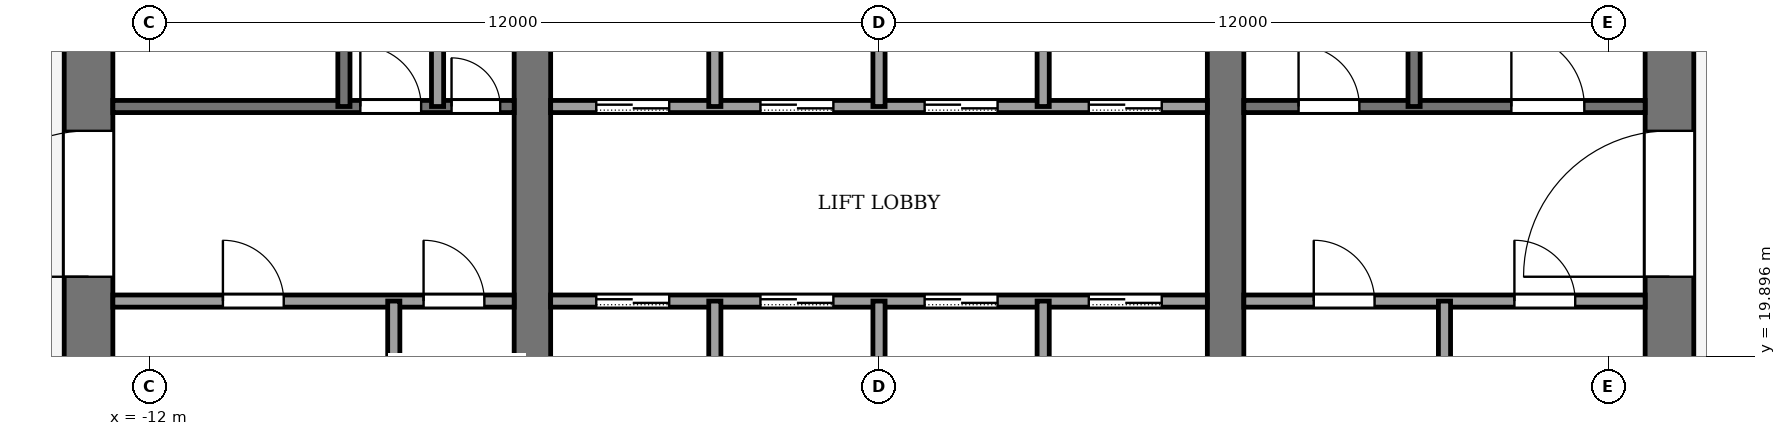
"""IFC4 building model, lengths in metres.
Left out: names, types, materials, properties, quantities, classifications, styles, units other than length and angle.
Written with IfcOpenShell. Run it as: python <this file> out.ifc"""

import sys

from ifc_helpers import new_model, si_unit, direction, frame, frame_2d, origin, place, context, subcontext, project, spatial, rectangle, extrude, element, fill, save


model = new_model("IFC4")
c1 = context("Model", 3, precision=1e-05, world=origin(), true_north=direction((0.0, 1.0)))
c2 = subcontext(c1, "Body", "Model", "MODEL_VIEW")
j1 = project(units=[si_unit("LENGTHUNIT", "METRE"), si_unit("PLANEANGLEUNIT", "RADIAN")], contexts=[c1])
p1 = place(None, origin())
s1 = spatial("IfcSite", under=j1, at=p1, CompositionType="ELEMENT")
p2 = place(p1, origin())
s2 = spatial("IfcBuilding", under=s1, at=p2, CompositionType="ELEMENT")
p3 = place(p2, frame((0.0, 0.0, 262.0)))
s3 = spatial("IfcBuildingStorey", under=s2, at=p3, CompositionType="ELEMENT", Elevation=262.0)
p4 = place(p3, frame((-13.0, 18.4, -0.13), z_axis=(0.0, 0.0, 1.0), x_axis=(0.0, 1.0, 0.0)))
e1 = element("IfcWall", 1, at=p4, inside=s3, PredefinedType="SHEAR", context=c2, shape_type="SweptSolid", body=[
    extrude(rectangle(XDim=19.2, YDim=0.8, at=frame_2d((9.6, 0.0))), origin(), (0.0, 0.0, 1.0), 4.0),
])
p5 = place(p4, frame((2.8, 0.0, 0.13)))
e2 = element("IfcOpeningElement", 2, at=p5, cuts=e1, PredefinedType="OPENING", context=c2, shape_type="SweptSolid", body=[
    extrude(rectangle(XDim=2.4, YDim=2.4, at=frame_2d((1.2, 1.2))), frame((0.0, 0.41, 0.0), z_axis=(0.0, -1.0, 0.0), x_axis=(1.0, 0.0, 0.0)), (0.0, 0.0, 1.0), 0.82),
])
p6 = place(p4, frame((13.4, 0.0, 0.13)))
e3 = element("IfcOpeningElement", 3, at=p6, cuts=e1, PredefinedType="OPENING", context=c2, shape_type="SweptSolid", body=[
    extrude(rectangle(XDim=1.4, YDim=2.2, at=frame_2d((0.7, 1.1))), frame((0.0, 0.41, 0.0), z_axis=(0.0, -1.0, 0.0), x_axis=(1.0, 0.0, 0.0)), (0.0, 0.0, 1.0), 0.82),
])
p7 = place(p3, frame((13.0, 18.4, -0.13), z_axis=(0.0, 0.0, 1.0), x_axis=(0.0, 1.0, 0.0)))
e4 = element("IfcWall", 4, at=p7, inside=s3, PredefinedType="SHEAR", context=c2, shape_type="SweptSolid", body=[
    extrude(rectangle(XDim=19.2, YDim=0.8, at=frame_2d((9.6, 0.0))), origin(), (0.0, 0.0, 1.0), 4.0),
])
p8 = place(p7, frame((2.8, 0.0, 0.13)))
e5 = element("IfcOpeningElement", 5, at=p8, cuts=e4, PredefinedType="OPENING", context=c2, shape_type="SweptSolid", body=[
    extrude(rectangle(XDim=2.4, YDim=2.4, at=frame_2d((1.2, 1.2))), frame((0.0, 0.41, 0.0), z_axis=(0.0, -1.0, 0.0), x_axis=(1.0, 0.0, 0.0)), (0.0, 0.0, 1.0), 0.82),
])
p9 = place(p7, frame((13.3, 0.0, 0.13)))
e6 = element("IfcOpeningElement", 6, at=p9, cuts=e4, PredefinedType="OPENING", context=c2, shape_type="SweptSolid", body=[
    extrude(rectangle(XDim=2.4, YDim=2.4, at=frame_2d((1.2, 1.2))), frame((0.0, 0.41, 0.0), z_axis=(0.0, -1.0, 0.0), x_axis=(1.0, 0.0, 0.0)), (0.0, 0.0, 1.0), 0.82),
])
p10 = place(p3, frame((-5.7, 18.4, -0.13), z_axis=(0.0, 0.0, 1.0), x_axis=(0.0, 1.0, 0.0)))
e7 = element("IfcWall", 7, at=p10, inside=s3, PredefinedType="SHEAR", context=c2, shape_type="SweptSolid", body=[
    extrude(rectangle(XDim=19.2, YDim=0.6, at=frame_2d((9.6, 0.0))), origin(), (0.0, 0.0, 1.0), 4.0),
])
p11 = place(p10, frame((8.35, 0.0, 0.13)))
e8 = element("IfcOpeningElement", 8, at=p11, cuts=e7, PredefinedType="OPENING", context=c2, shape_type="SweptSolid", body=[
    extrude(rectangle(XDim=0.9, YDim=2.1, at=frame_2d((0.45, 1.05))), frame((0.0, 0.31, 0.0), z_axis=(0.0, -1.0, 0.0), x_axis=(1.0, 0.0, 0.0)), (0.0, 0.0, 1.0), 0.62),
])
p12 = place(p3, frame((5.7, 18.4, -0.13), z_axis=(0.0, 0.0, 1.0), x_axis=(0.0, 1.0, 0.0)))
e9 = element("IfcWall", 9, at=p12, inside=s3, PredefinedType="SHEAR", context=c2, shape_type="SweptSolid", body=[
    extrude(rectangle(XDim=19.2, YDim=0.6, at=frame_2d((9.6, 0.0))), origin(), (0.0, 0.0, 1.0), 4.0),
])
p13 = place(p12, frame((8.35, 0.0, 0.13)))
e10 = element("IfcOpeningElement", 10, at=p13, cuts=e9, PredefinedType="OPENING", context=c2, shape_type="SweptSolid", body=[
    extrude(rectangle(XDim=0.9, YDim=2.1, at=frame_2d((0.45, 1.05))), frame((0.0, 0.31, 0.0), z_axis=(0.0, -1.0, 0.0), x_axis=(1.0, 0.0, 0.0)), (0.0, 0.0, 1.0), 0.62),
])
p14 = place(p12, frame((13.3, 0.0, 0.13)))
e11 = element("IfcOpeningElement", 11, at=p14, cuts=e9, PredefinedType="OPENING", context=c2, shape_type="SweptSolid", body=[
    extrude(rectangle(XDim=2.4, YDim=2.4, at=frame_2d((1.2, 1.2))), frame((0.0, 0.31, 0.0), z_axis=(0.0, -1.0, 0.0), x_axis=(1.0, 0.0, 0.0)), (0.0, 0.0, 1.0), 0.62),
])
p15 = place(p3, frame((-12.6, 20.8, 0.0), z_axis=(0.0, 0.0, 1.0), x_axis=(1.0, 0.0, 0.0)))
e12 = element("IfcWall", 12, at=p15, inside=s3, PredefinedType="PARTITIONING", context=c2, shape_type="SweptSolid", body=[
    extrude(rectangle(XDim=6.6, YDim=0.2, at=frame_2d((3.3, 0.0))), origin(), (0.0, 0.0, 1.0), 3.87),
])
p16 = place(p15, frame((1.81, 0.0, 0.0)))
e13 = element("IfcOpeningElement", 13, at=p16, cuts=e12, PredefinedType="OPENING", context=c2, shape_type="SweptSolid", body=[
    extrude(rectangle(XDim=1.0, YDim=2.1, at=frame_2d((0.5, 1.05))), frame((0.0, 0.11, 0.0), z_axis=(0.0, -1.0, 0.0), x_axis=(1.0, 0.0, 0.0)), (0.0, 0.0, 1.0), 0.22),
])
p17 = place(p15, frame((5.11, 0.0, 0.0)))
e14 = element("IfcOpeningElement", 14, at=p17, cuts=e12, PredefinedType="OPENING", context=c2, shape_type="SweptSolid", body=[
    extrude(rectangle(XDim=1.0, YDim=2.1, at=frame_2d((0.5, 1.05))), frame((0.0, 0.11, 0.0), z_axis=(0.0, -1.0, 0.0), x_axis=(1.0, 0.0, 0.0)), (0.0, 0.0, 1.0), 0.22),
])
p18 = place(p3, frame((-5.4, 20.8, 0.0), z_axis=(0.0, 0.0, 1.0), x_axis=(1.0, 0.0, 0.0)))
e15 = element("IfcWall", 15, at=p18, inside=s3, PredefinedType="PARTITIONING", context=c2, shape_type="SweptSolid", body=[
    extrude(rectangle(XDim=10.8, YDim=0.2, at=frame_2d((5.4, 0.0))), origin(), (0.0, 0.0, 1.0), 3.87),
])
p19 = place(p18, frame((0.75, 0.0, 0.0)))
e16 = element("IfcOpeningElement", 16, at=p19, cuts=e15, PredefinedType="OPENING", context=c2, shape_type="SweptSolid", body=[
    extrude(rectangle(XDim=1.2, YDim=2.2, at=frame_2d((0.6, 1.1))), frame((0.0, 0.11, 0.0), z_axis=(0.0, -1.0, 0.0), x_axis=(1.0, 0.0, 0.0)), (0.0, 0.0, 1.0), 0.22),
])
p20 = place(p18, frame((3.45, 0.0, 0.0)))
e17 = element("IfcOpeningElement", 17, at=p20, cuts=e15, PredefinedType="OPENING", context=c2, shape_type="SweptSolid", body=[
    extrude(rectangle(XDim=1.2, YDim=2.2, at=frame_2d((0.6, 1.1))), frame((0.0, 0.11, 0.0), z_axis=(0.0, -1.0, 0.0), x_axis=(1.0, 0.0, 0.0)), (0.0, 0.0, 1.0), 0.22),
])
p21 = place(p18, frame((6.15, 0.0, 0.0)))
e18 = element("IfcOpeningElement", 18, at=p21, cuts=e15, PredefinedType="OPENING", context=c2, shape_type="SweptSolid", body=[
    extrude(rectangle(XDim=1.2, YDim=2.2, at=frame_2d((0.6, 1.1))), frame((0.0, 0.11, 0.0), z_axis=(0.0, -1.0, 0.0), x_axis=(1.0, 0.0, 0.0)), (0.0, 0.0, 1.0), 0.22),
])
p22 = place(p18, frame((8.85, 0.0, 0.0)))
e19 = element("IfcOpeningElement", 19, at=p22, cuts=e15, PredefinedType="OPENING", context=c2, shape_type="SweptSolid", body=[
    extrude(rectangle(XDim=1.2, YDim=2.2, at=frame_2d((0.6, 1.1))), frame((0.0, 0.11, 0.0), z_axis=(0.0, -1.0, 0.0), x_axis=(1.0, 0.0, 0.0)), (0.0, 0.0, 1.0), 0.22),
])
p23 = place(p3, frame((6.0, 20.8, 0.0), z_axis=(0.0, 0.0, 1.0), x_axis=(1.0, 0.0, 0.0)))
e20 = element("IfcWall", 20, at=p23, inside=s3, PredefinedType="PARTITIONING", context=c2, shape_type="SweptSolid", body=[
    extrude(rectangle(XDim=6.6, YDim=0.2, at=frame_2d((3.3, 0.0))), origin(), (0.0, 0.0, 1.0), 3.87),
])
p24 = place(p23, frame((1.15, 0.0, 0.0)))
e21 = element("IfcOpeningElement", 21, at=p24, cuts=e20, PredefinedType="OPENING", context=c2, shape_type="SweptSolid", body=[
    extrude(rectangle(XDim=1.0, YDim=2.1, at=frame_2d((0.5, 1.05))), frame((0.0, 0.11, 0.0), z_axis=(0.0, -1.0, 0.0), x_axis=(1.0, 0.0, 0.0)), (0.0, 0.0, 1.0), 0.22),
])
p25 = place(p23, frame((4.45, 0.0, 0.0)))
e22 = element("IfcOpeningElement", 22, at=p25, cuts=e20, PredefinedType="OPENING", context=c2, shape_type="SweptSolid", body=[
    extrude(rectangle(XDim=1.0, YDim=2.1, at=frame_2d((0.5, 1.05))), frame((0.0, 0.11, 0.0), z_axis=(0.0, -1.0, 0.0), x_axis=(1.0, 0.0, 0.0)), (0.0, 0.0, 1.0), 0.22),
])
p26 = place(p3, frame((-12.6, 24.0, 0.0), z_axis=(0.0, 0.0, 1.0), x_axis=(1.0, 0.0, 0.0)))
e23 = element("IfcWall", 23, at=p26, inside=s3, PredefinedType="PARTITIONING", context=c2, shape_type="SweptSolid", body=[
    extrude(rectangle(XDim=6.6, YDim=0.2, at=frame_2d((3.3, 0.0))), origin(), (0.0, 0.0, 1.0), 3.87),
])
p27 = place(p26, frame((4.07, 0.0, 0.0)))
e24 = element("IfcOpeningElement", 24, at=p27, cuts=e23, PredefinedType="OPENING", context=c2, shape_type="SweptSolid", body=[
    extrude(rectangle(XDim=1.0, YDim=2.1, at=frame_2d((0.5, 1.05))), frame((0.0, 0.11, 0.0), z_axis=(0.0, -1.0, 0.0), x_axis=(1.0, 0.0, 0.0)), (0.0, 0.0, 1.0), 0.22),
])
p28 = place(p26, frame((5.57, 0.0, 0.0)))
e25 = element("IfcOpeningElement", 25, at=p28, cuts=e23, PredefinedType="OPENING", context=c2, shape_type="SweptSolid", body=[
    extrude(rectangle(XDim=0.8, YDim=2.1, at=frame_2d((0.4, 1.05))), frame((0.0, 0.11, 0.0), z_axis=(0.0, -1.0, 0.0), x_axis=(1.0, 0.0, 0.0)), (0.0, 0.0, 1.0), 0.22),
])
p29 = place(p3, frame((-5.4, 24.0, 0.0), z_axis=(0.0, 0.0, 1.0), x_axis=(1.0, 0.0, 0.0)))
e26 = element("IfcWall", 26, at=p29, inside=s3, PredefinedType="PARTITIONING", context=c2, shape_type="SweptSolid", body=[
    extrude(rectangle(XDim=10.8, YDim=0.2, at=frame_2d((5.4, 0.0))), origin(), (0.0, 0.0, 1.0), 3.87),
])
p30 = place(p29, frame((0.75, 0.0, 0.0)))
e27 = element("IfcOpeningElement", 27, at=p30, cuts=e26, PredefinedType="OPENING", context=c2, shape_type="SweptSolid", body=[
    extrude(rectangle(XDim=1.2, YDim=2.2, at=frame_2d((0.6, 1.1))), frame((0.0, 0.11, 0.0), z_axis=(0.0, -1.0, 0.0), x_axis=(1.0, 0.0, 0.0)), (0.0, 0.0, 1.0), 0.22),
])
p31 = place(p29, frame((3.45, 0.0, 0.0)))
e28 = element("IfcOpeningElement", 28, at=p31, cuts=e26, PredefinedType="OPENING", context=c2, shape_type="SweptSolid", body=[
    extrude(rectangle(XDim=1.2, YDim=2.2, at=frame_2d((0.6, 1.1))), frame((0.0, 0.11, 0.0), z_axis=(0.0, -1.0, 0.0), x_axis=(1.0, 0.0, 0.0)), (0.0, 0.0, 1.0), 0.22),
])
p32 = place(p29, frame((6.15, 0.0, 0.0)))
e29 = element("IfcOpeningElement", 29, at=p32, cuts=e26, PredefinedType="OPENING", context=c2, shape_type="SweptSolid", body=[
    extrude(rectangle(XDim=1.2, YDim=2.2, at=frame_2d((0.6, 1.1))), frame((0.0, 0.11, 0.0), z_axis=(0.0, -1.0, 0.0), x_axis=(1.0, 0.0, 0.0)), (0.0, 0.0, 1.0), 0.22),
])
p33 = place(p29, frame((8.85, 0.0, 0.0)))
e30 = element("IfcOpeningElement", 30, at=p33, cuts=e26, PredefinedType="OPENING", context=c2, shape_type="SweptSolid", body=[
    extrude(rectangle(XDim=1.2, YDim=2.2, at=frame_2d((0.6, 1.1))), frame((0.0, 0.11, 0.0), z_axis=(0.0, -1.0, 0.0), x_axis=(1.0, 0.0, 0.0)), (0.0, 0.0, 1.0), 0.22),
])
p34 = place(p3, frame((6.0, 24.0, 0.0), z_axis=(0.0, 0.0, 1.0), x_axis=(1.0, 0.0, 0.0)))
e31 = element("IfcWall", 31, at=p34, inside=s3, PredefinedType="PARTITIONING", context=c2, shape_type="SweptSolid", body=[
    extrude(rectangle(XDim=6.6, YDim=0.2, at=frame_2d((3.3, 0.0))), origin(), (0.0, 0.0, 1.0), 3.87),
])
p35 = place(p34, frame((0.9, 0.0, 0.0)))
e32 = element("IfcOpeningElement", 32, at=p35, cuts=e31, PredefinedType="OPENING", context=c2, shape_type="SweptSolid", body=[
    extrude(rectangle(XDim=1.0, YDim=2.1, at=frame_2d((0.5, 1.05))), frame((0.0, 0.11, 0.0), z_axis=(0.0, -1.0, 0.0), x_axis=(1.0, 0.0, 0.0)), (0.0, 0.0, 1.0), 0.22),
])
p36 = place(p34, frame((4.4, 0.0, 0.0)))
e33 = element("IfcOpeningElement", 33, at=p36, cuts=e31, PredefinedType="OPENING", context=c2, shape_type="SweptSolid", body=[
    extrude(rectangle(XDim=1.2, YDim=2.2, at=frame_2d((0.6, 1.1))), frame((0.0, 0.11, 0.0), z_axis=(0.0, -1.0, 0.0), x_axis=(1.0, 0.0, 0.0)), (0.0, 0.0, 1.0), 0.22),
])
p37 = place(p3, frame((-8.8, 24.0, 0.0), z_axis=(0.0, 0.0, 1.0), x_axis=(0.0, 1.0, 0.0)))
e34 = element("IfcWall", 34, at=p37, inside=s3, PredefinedType="PARTITIONING", context=c2, shape_type="SweptSolid", body=[
    extrude(rectangle(XDim=7.4, YDim=0.2, at=frame_2d((3.7, 0.0))), origin(), (0.0, 0.0, 1.0), 3.87),
])
p38 = place(p3, frame((-7.98, 18.4, 0.0), z_axis=(0.0, 0.0, 1.0), x_axis=(0.0, 1.0, 0.0)))
e35 = element("IfcWall", 35, at=p38, inside=s3, PredefinedType="PARTITIONING", context=c2, shape_type="SweptSolid", body=[
    extrude(rectangle(XDim=2.4, YDim=0.2, at=frame_2d((1.2, 0.0))), origin(), (0.0, 0.0, 1.0), 3.87),
])
p39 = place(p3, frame((-7.26, 24.0, 0.0), z_axis=(0.0, 0.0, 1.0), x_axis=(0.0, 1.0, 0.0)))
e36 = element("IfcWall", 36, at=p39, inside=s3, PredefinedType="PARTITIONING", context=c2, shape_type="SweptSolid", body=[
    extrude(rectangle(XDim=7.4, YDim=0.2, at=frame_2d((3.7, 0.0))), origin(), (0.0, 0.0, 1.0), 3.87),
])
p40 = place(p3, frame((-2.7, 18.4, 0.0), z_axis=(0.0, 0.0, 1.0), x_axis=(0.0, 1.0, 0.0)))
e37 = element("IfcWall", 37, at=p40, inside=s3, PredefinedType="PARTITIONING", context=c2, shape_type="SweptSolid", body=[
    extrude(rectangle(XDim=2.4, YDim=0.2, at=frame_2d((1.2, 0.0))), origin(), (0.0, 0.0, 1.0), 3.87),
])
p41 = place(p3, frame((-2.7, 24.0, 0.0), z_axis=(0.0, 0.0, 1.0), x_axis=(0.0, 1.0, 0.0)))
e38 = element("IfcWall", 38, at=p41, inside=s3, PredefinedType="PARTITIONING", context=c2, shape_type="SweptSolid", body=[
    extrude(rectangle(XDim=2.4, YDim=0.2, at=frame_2d((1.2, 0.0))), origin(), (0.0, 0.0, 1.0), 3.87),
])
p42 = place(p3, frame((0.0, 18.4, 0.0), z_axis=(0.0, 0.0, 1.0), x_axis=(0.0, 1.0, 0.0)))
e39 = element("IfcWall", 39, at=p42, inside=s3, PredefinedType="PARTITIONING", context=c2, shape_type="SweptSolid", body=[
    extrude(rectangle(XDim=2.4, YDim=0.2, at=frame_2d((1.2, 0.0))), origin(), (0.0, 0.0, 1.0), 3.87),
])
p43 = place(p3, frame((0.0, 24.0, 0.0), z_axis=(0.0, 0.0, 1.0), x_axis=(0.0, 1.0, 0.0)))
e40 = element("IfcWall", 40, at=p43, inside=s3, PredefinedType="PARTITIONING", context=c2, shape_type="SweptSolid", body=[
    extrude(rectangle(XDim=4.0, YDim=0.2, at=frame_2d((2.0, 0.0))), origin(), (0.0, 0.0, 1.0), 3.87),
])
p44 = place(p3, frame((2.7, 18.4, 0.0), z_axis=(0.0, 0.0, 1.0), x_axis=(0.0, 1.0, 0.0)))
e41 = element("IfcWall", 41, at=p44, inside=s3, PredefinedType="PARTITIONING", context=c2, shape_type="SweptSolid", body=[
    extrude(rectangle(XDim=2.4, YDim=0.2, at=frame_2d((1.2, 0.0))), origin(), (0.0, 0.0, 1.0), 3.87),
])
p45 = place(p3, frame((2.7, 24.0, 0.0), z_axis=(0.0, 0.0, 1.0), x_axis=(0.0, 1.0, 0.0)))
e42 = element("IfcWall", 42, at=p45, inside=s3, PredefinedType="PARTITIONING", context=c2, shape_type="SweptSolid", body=[
    extrude(rectangle(XDim=2.4, YDim=0.2, at=frame_2d((1.2, 0.0))), origin(), (0.0, 0.0, 1.0), 3.87),
])
p46 = place(p3, frame((8.8, 24.0, 0.0), z_axis=(0.0, 0.0, 1.0), x_axis=(0.0, 1.0, 0.0)))
e43 = element("IfcWall", 43, at=p46, inside=s3, PredefinedType="PARTITIONING", context=c2, shape_type="SweptSolid", body=[
    extrude(rectangle(XDim=7.4, YDim=0.2, at=frame_2d((3.7, 0.0))), origin(), (0.0, 0.0, 1.0), 3.87),
])
p47 = place(p3, frame((9.3, 18.4, 0.0), z_axis=(0.0, 0.0, 1.0), x_axis=(0.0, 1.0, 0.0)))
e44 = element("IfcWall", 44, at=p47, inside=s3, PredefinedType="PARTITIONING", context=c2, shape_type="SweptSolid", body=[
    extrude(rectangle(XDim=2.4, YDim=0.2, at=frame_2d((1.2, 0.0))), origin(), (0.0, 0.0, 1.0), 3.87),
])
p48 = place(p19, origin())
e45 = element("IfcDoor", 45, at=p48, inside=s3, OperationType="SLIDING_TO_LEFT", PredefinedType="DOOR", context=c2, shape_type="SweptSolid", body=[
    extrude(rectangle(XDim=1.2, YDim=2.2, at=frame_2d((0.6, 1.1))), frame((0.0, 0.025, 0.0), z_axis=(0.0, -1.0, 0.0), x_axis=(1.0, 0.0, 0.0)), (0.0, 0.0, 1.0), 0.05),
])
fill(e16, e45)
p49 = place(p20, origin())
e46 = element("IfcDoor", 46, at=p49, inside=s3, OperationType="SLIDING_TO_LEFT", PredefinedType="DOOR", context=c2, shape_type="SweptSolid", body=[
    extrude(rectangle(XDim=1.2, YDim=2.2, at=frame_2d((0.6, 1.1))), frame((0.0, 0.025, 0.0), z_axis=(0.0, -1.0, 0.0), x_axis=(1.0, 0.0, 0.0)), (0.0, 0.0, 1.0), 0.05),
])
fill(e17, e46)
p50 = place(p21, origin())
e47 = element("IfcDoor", 47, at=p50, inside=s3, OperationType="SLIDING_TO_LEFT", PredefinedType="DOOR", context=c2, shape_type="SweptSolid", body=[
    extrude(rectangle(XDim=1.2, YDim=2.2, at=frame_2d((0.6, 1.1))), frame((0.0, 0.025, 0.0), z_axis=(0.0, -1.0, 0.0), x_axis=(1.0, 0.0, 0.0)), (0.0, 0.0, 1.0), 0.05),
])
fill(e18, e47)
p51 = place(p22, origin())
e48 = element("IfcDoor", 48, at=p51, inside=s3, OperationType="SLIDING_TO_LEFT", PredefinedType="DOOR", context=c2, shape_type="SweptSolid", body=[
    extrude(rectangle(XDim=1.2, YDim=2.2, at=frame_2d((0.6, 1.1))), frame((0.0, 0.025, 0.0), z_axis=(0.0, -1.0, 0.0), x_axis=(1.0, 0.0, 0.0)), (0.0, 0.0, 1.0), 0.05),
])
fill(e19, e48)
p52 = place(p30, origin())
e49 = element("IfcDoor", 49, at=p52, inside=s3, OperationType="SLIDING_TO_LEFT", PredefinedType="DOOR", context=c2, shape_type="SweptSolid", body=[
    extrude(rectangle(XDim=1.2, YDim=2.2, at=frame_2d((0.6, 1.1))), frame((0.0, 0.025, 0.0), z_axis=(0.0, -1.0, 0.0), x_axis=(1.0, 0.0, 0.0)), (0.0, 0.0, 1.0), 0.05),
])
fill(e27, e49)
p53 = place(p31, origin())
e50 = element("IfcDoor", 50, at=p53, inside=s3, OperationType="SLIDING_TO_LEFT", PredefinedType="DOOR", context=c2, shape_type="SweptSolid", body=[
    extrude(rectangle(XDim=1.2, YDim=2.2, at=frame_2d((0.6, 1.1))), frame((0.0, 0.025, 0.0), z_axis=(0.0, -1.0, 0.0), x_axis=(1.0, 0.0, 0.0)), (0.0, 0.0, 1.0), 0.05),
])
fill(e28, e50)
p54 = place(p32, origin())
e51 = element("IfcDoor", 51, at=p54, inside=s3, OperationType="SLIDING_TO_LEFT", PredefinedType="DOOR", context=c2, shape_type="SweptSolid", body=[
    extrude(rectangle(XDim=1.2, YDim=2.2, at=frame_2d((0.6, 1.1))), frame((0.0, 0.025, 0.0), z_axis=(0.0, -1.0, 0.0), x_axis=(1.0, 0.0, 0.0)), (0.0, 0.0, 1.0), 0.05),
])
fill(e29, e51)
p55 = place(p33, origin())
e52 = element("IfcDoor", 52, at=p55, inside=s3, OperationType="SLIDING_TO_LEFT", PredefinedType="DOOR", context=c2, shape_type="SweptSolid", body=[
    extrude(rectangle(XDim=1.2, YDim=2.2, at=frame_2d((0.6, 1.1))), frame((0.0, 0.025, 0.0), z_axis=(0.0, -1.0, 0.0), x_axis=(1.0, 0.0, 0.0)), (0.0, 0.0, 1.0), 0.05),
])
fill(e30, e52)
p56 = place(p16, origin())
e53 = element("IfcDoor", 53, at=p56, inside=s3, OperationType="SINGLE_SWING_LEFT", PredefinedType="DOOR", context=c2, shape_type="SweptSolid", body=[
    extrude(rectangle(XDim=1.0, YDim=2.1, at=frame_2d((0.5, 1.05))), frame((0.0, 0.025, 0.0), z_axis=(0.0, -1.0, 0.0), x_axis=(1.0, 0.0, 0.0)), (0.0, 0.0, 1.0), 0.05),
])
fill(e13, e53)
p57 = place(p17, origin())
e54 = element("IfcDoor", 54, at=p57, inside=s3, OperationType="SINGLE_SWING_LEFT", PredefinedType="DOOR", context=c2, shape_type="SweptSolid", body=[
    extrude(rectangle(XDim=1.0, YDim=2.1, at=frame_2d((0.5, 1.05))), frame((0.0, 0.025, 0.0), z_axis=(0.0, -1.0, 0.0), x_axis=(1.0, 0.0, 0.0)), (0.0, 0.0, 1.0), 0.05),
])
fill(e14, e54)
p58 = place(p24, origin())
e55 = element("IfcDoor", 55, at=p58, inside=s3, OperationType="SINGLE_SWING_LEFT", PredefinedType="DOOR", context=c2, shape_type="SweptSolid", body=[
    extrude(rectangle(XDim=1.0, YDim=2.1, at=frame_2d((0.5, 1.05))), frame((0.0, 0.025, 0.0), z_axis=(0.0, -1.0, 0.0), x_axis=(1.0, 0.0, 0.0)), (0.0, 0.0, 1.0), 0.05),
])
fill(e21, e55)
p59 = place(p25, origin())
e56 = element("IfcDoor", 56, at=p59, inside=s3, OperationType="SINGLE_SWING_LEFT", PredefinedType="DOOR", context=c2, shape_type="SweptSolid", body=[
    extrude(rectangle(XDim=1.0, YDim=2.1, at=frame_2d((0.5, 1.05))), frame((0.0, 0.025, 0.0), z_axis=(0.0, -1.0, 0.0), x_axis=(1.0, 0.0, 0.0)), (0.0, 0.0, 1.0), 0.05),
])
fill(e22, e56)
p60 = place(p27, origin())
e57 = element("IfcDoor", 57, at=p60, inside=s3, OperationType="SINGLE_SWING_RIGHT", PredefinedType="DOOR", context=c2, shape_type="SweptSolid", body=[
    extrude(rectangle(XDim=1.0, YDim=2.1, at=frame_2d((0.5, 1.05))), frame((0.0, 0.025, 0.0), z_axis=(0.0, -1.0, 0.0), x_axis=(1.0, 0.0, 0.0)), (0.0, 0.0, 1.0), 0.05),
])
fill(e24, e57)
p61 = place(p28, origin())
e58 = element("IfcDoor", 58, at=p61, inside=s3, OperationType="SINGLE_SWING_LEFT", PredefinedType="DOOR", context=c2, shape_type="SweptSolid", body=[
    extrude(rectangle(XDim=0.8, YDim=2.1, at=frame_2d((0.4, 1.05))), frame((0.0, 0.025, 0.0), z_axis=(0.0, -1.0, 0.0), x_axis=(1.0, 0.0, 0.0)), (0.0, 0.0, 1.0), 0.05),
])
fill(e25, e58)
p62 = place(p35, origin())
e59 = element("IfcDoor", 59, at=p62, inside=s3, OperationType="SINGLE_SWING_RIGHT", PredefinedType="DOOR", context=c2, shape_type="SweptSolid", body=[
    extrude(rectangle(XDim=1.0, YDim=2.1, at=frame_2d((0.5, 1.05))), frame((0.0, 0.025, 0.0), z_axis=(0.0, -1.0, 0.0), x_axis=(1.0, 0.0, 0.0)), (0.0, 0.0, 1.0), 0.05),
])
fill(e32, e59)
p63 = place(p36, origin())
e60 = element("IfcDoor", 60, at=p63, inside=s3, OperationType="SINGLE_SWING_LEFT", PredefinedType="DOOR", context=c2, shape_type="SweptSolid", body=[
    extrude(rectangle(XDim=1.2, YDim=2.2, at=frame_2d((0.6, 1.1))), frame((0.0, 0.025, 0.0), z_axis=(0.0, -1.0, 0.0), x_axis=(1.0, 0.0, 0.0)), (0.0, 0.0, 1.0), 0.05),
])
fill(e33, e60)
p64 = place(p5, origin())
e61 = element("IfcDoor", 61, at=p64, inside=s3, OperationType="DOUBLE_DOOR_SINGLE_SWING", PredefinedType="DOOR", context=c2, shape_type="SweptSolid", body=[
    extrude(rectangle(XDim=2.4, YDim=2.4, at=frame_2d((1.2, 1.2))), frame((0.0, 0.025, 0.0), z_axis=(0.0, -1.0, 0.0), x_axis=(1.0, 0.0, 0.0)), (0.0, 0.0, 1.0), 0.05),
])
fill(e2, e61)
p65 = place(p8, origin())
e62 = element("IfcDoor", 62, at=p65, inside=s3, OperationType="DOUBLE_DOOR_SINGLE_SWING", PredefinedType="DOOR", context=c2, shape_type="SweptSolid", body=[
    extrude(rectangle(XDim=2.4, YDim=2.4, at=frame_2d((1.2, 1.2))), frame((0.0, 0.025, 0.0), z_axis=(0.0, -1.0, 0.0), x_axis=(1.0, 0.0, 0.0)), (0.0, 0.0, 1.0), 0.05),
])
fill(e5, e62)
save(model, sys.argv[1])
